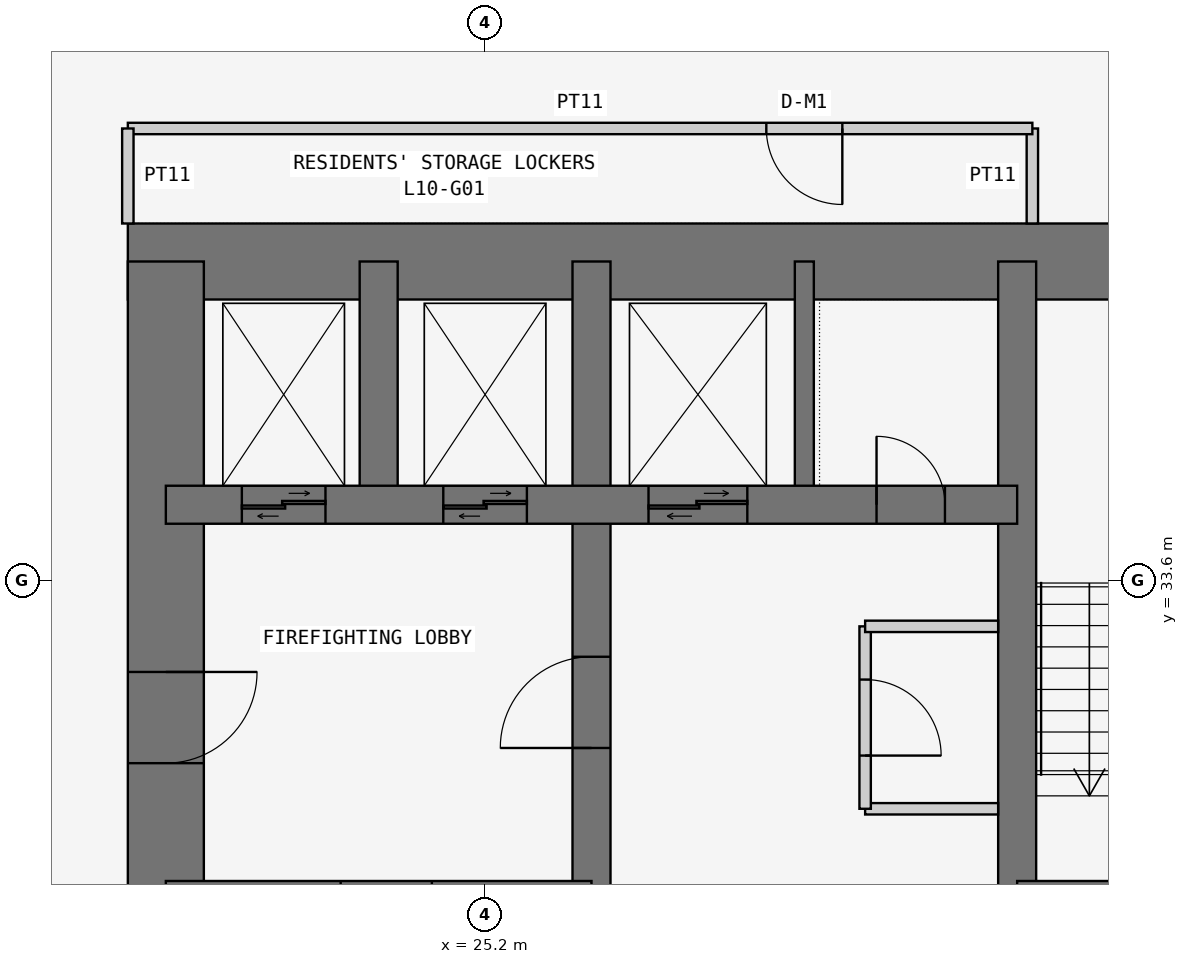
"""IFC4 building model, lengths in metres.
Left out: names, types, materials, properties, quantities, classifications, styles, units other than length and angle.
Written with IfcOpenShell. Run it as: python <this file> out.ifc"""

import sys

from ifc_helpers import new_model, si_unit, direction, frame, frame_2d, origin, place, context, subcontext, project, spatial, rectangle, extrude, element, fill, save


model = new_model("IFC4")
c1 = context("Model", 3, precision=1e-05, world=origin(), true_north=direction((0.0, 1.0)))
c2 = subcontext(c1, "Body", "Model", "MODEL_VIEW")
j1 = project(units=[si_unit("LENGTHUNIT", "METRE"), si_unit("PLANEANGLEUNIT", "RADIAN")], contexts=[c1])
p1 = place(None, origin())
s1 = spatial("IfcSite", under=j1, at=p1, CompositionType="ELEMENT")
p2 = place(p1, origin())
s2 = spatial("IfcBuilding", under=s1, at=p2, CompositionType="ELEMENT")
p3 = place(p2, frame((0.0, 0.0, 45.3)))
s3 = spatial("IfcBuildingStorey", under=s2, at=p3, CompositionType="ELEMENT", Elevation=45.3)
p4 = place(p3, frame((37.8, 37.8, 0.0), z_axis=(0.0, 0.0, 1.0), x_axis=(-1.0, 0.0, 0.0)))
e1 = element("IfcWall", 1, at=p4, inside=s3, PredefinedType="SHEAR", context=c2, shape_type="SweptSolid", body=[
    extrude(rectangle(XDim=17.3, YDim=1.0, at=frame_2d((8.65, 0.0))), origin(), (0.0, 0.0, 1.0), 3.6),
])
p5 = place(p3, frame((21.0, 37.8, 0.0), z_axis=(0.0, 0.0, 1.0), x_axis=(0.0, -1.0, 0.0)))
e2 = element("IfcWall", 2, at=p5, inside=s3, PredefinedType="SHEAR", context=c2, shape_type="SweptSolid", body=[
    extrude(rectangle(XDim=17.3, YDim=1.0, at=frame_2d((8.65, 0.0))), origin(), (0.0, 0.0, 1.0), 3.6),
])
p6 = place(p5, frame((5.4, 0.0, 0.0)))
e3 = element("IfcOpeningElement", 3, at=p6, cuts=e2, PredefinedType="OPENING", context=c2, shape_type="SweptSolid", body=[
    extrude(rectangle(XDim=1.2, YDim=2.1, at=frame_2d((0.6, 1.05))), frame((0.0, 0.51, 0.0), z_axis=(0.0, -1.0, 0.0), x_axis=(1.0, 0.0, 0.0)), (0.0, 0.0, 1.0), 1.02),
])
p7 = place(p3, frame((26.6, 21.0, 0.0), z_axis=(0.0, 0.0, 1.0), x_axis=(0.0, 1.0, 0.0)))
e4 = element("IfcWall", 4, at=p7, inside=s3, PredefinedType="SHEAR", context=c2, shape_type="SweptSolid", body=[
    extrude(rectangle(XDim=16.8, YDim=0.5, at=frame_2d((8.4, 0.0))), origin(), (0.0, 0.0, 1.0), 3.6),
])
p8 = place(p7, frame((10.4, 0.0, 0.0)))
e5 = element("IfcOpeningElement", 5, at=p8, cuts=e4, PredefinedType="OPENING", context=c2, shape_type="SweptSolid", body=[
    extrude(rectangle(XDim=1.2, YDim=2.1, at=frame_2d((0.6, 1.05))), frame((0.0, 0.26, 0.0), z_axis=(0.0, -1.0, 0.0), x_axis=(1.0, 0.0, 0.0)), (0.0, 0.0, 1.0), 0.52),
])
p9 = place(p3, frame((21.0, 29.4, 0.0), z_axis=(0.0, 0.0, 1.0), x_axis=(1.0, 0.0, 0.0)))
e6 = element("IfcWall", 6, at=p9, inside=s3, PredefinedType="SHEAR", context=c2, shape_type="SweptSolid", body=[
    extrude(rectangle(XDim=5.6, YDim=0.5, at=frame_2d((2.8, 0.0))), origin(), (0.0, 0.0, 1.0), 3.6),
])
p10 = place(p9, frame((2.3, 0.0, 0.0)))
e7 = element("IfcOpeningElement", 7, at=p10, cuts=e6, PredefinedType="OPENING", context=c2, shape_type="SweptSolid", body=[
    extrude(rectangle(XDim=1.2, YDim=2.1, at=frame_2d((0.6, 1.05))), frame((0.0, 0.26, 0.0), z_axis=(0.0, -1.0, 0.0), x_axis=(1.0, 0.0, 0.0)), (0.0, 0.0, 1.0), 0.52),
])
p11 = place(p3, frame((21.0, 34.6, 0.0), z_axis=(0.0, 0.0, 1.0), x_axis=(1.0, 0.0, 0.0)))
e8 = element("IfcWall", 8, at=p11, inside=s3, PredefinedType="SHEAR", context=c2, shape_type="SweptSolid", body=[
    extrude(rectangle(XDim=11.2, YDim=0.5, at=frame_2d((5.6, 0.0))), origin(), (0.0, 0.0, 1.0), 3.6),
])
p12 = place(p11, frame((9.35, 0.0, 0.0)))
e9 = element("IfcOpeningElement", 9, at=p12, cuts=e8, PredefinedType="OPENING", context=c2, shape_type="SweptSolid", body=[
    extrude(rectangle(XDim=0.9, YDim=2.1, at=frame_2d((0.45, 1.05))), frame((0.0, 0.26, 0.0), z_axis=(0.0, -1.0, 0.0), x_axis=(1.0, 0.0, 0.0)), (0.0, 0.0, 1.0), 0.52),
])
p13 = place(p11, frame((1.0, 0.0, 0.0)))
e10 = element("IfcOpeningElement", 10, at=p13, cuts=e8, PredefinedType="OPENING", context=c2, shape_type="SweptSolid", body=[
    extrude(rectangle(XDim=1.1, YDim=2.1, at=frame_2d((0.55, 1.05))), frame((0.0, 0.26, 0.0), z_axis=(0.0, -1.0, 0.0), x_axis=(1.0, 0.0, 0.0)), (0.0, 0.0, 1.0), 0.52),
])
p14 = place(p11, frame((3.65, 0.0, 0.0)))
e11 = element("IfcOpeningElement", 11, at=p14, cuts=e8, PredefinedType="OPENING", context=c2, shape_type="SweptSolid", body=[
    extrude(rectangle(XDim=1.1, YDim=2.1, at=frame_2d((0.55, 1.05))), frame((0.0, 0.26, 0.0), z_axis=(0.0, -1.0, 0.0), x_axis=(1.0, 0.0, 0.0)), (0.0, 0.0, 1.0), 0.52),
])
p15 = place(p11, frame((6.35, 0.0, 0.0)))
e12 = element("IfcOpeningElement", 12, at=p15, cuts=e8, PredefinedType="OPENING", context=c2, shape_type="SweptSolid", body=[
    extrude(rectangle(XDim=1.3, YDim=2.1, at=frame_2d((0.65, 1.05))), frame((0.0, 0.26, 0.0), z_axis=(0.0, -1.0, 0.0), x_axis=(1.0, 0.0, 0.0)), (0.0, 0.0, 1.0), 0.52),
])
p16 = place(p3, frame((23.8, 34.6, 0.0), z_axis=(0.0, 0.0, 1.0), x_axis=(0.0, 1.0, 0.0)))
e13 = element("IfcWall", 13, at=p16, inside=s3, PredefinedType="SHEAR", context=c2, shape_type="SweptSolid", body=[
    extrude(rectangle(XDim=3.2, YDim=0.5, at=frame_2d((1.6, 0.0))), origin(), (0.0, 0.0, 1.0), 3.6),
])
p17 = place(p3, frame((32.2, 29.15, 0.0), z_axis=(0.0, 0.0, 1.0), x_axis=(0.0, 1.0, 0.0)))
e14 = element("IfcWall", 14, at=p17, inside=s3, PredefinedType="SHEAR", context=c2, shape_type="SweptSolid", body=[
    extrude(rectangle(XDim=8.65, YDim=0.5, at=frame_2d((4.325, 0.0))), origin(), (0.0, 0.0, 1.0), 3.6),
])
p18 = place(p3, frame((32.2, 29.4, 0.0), z_axis=(0.0, 0.0, 1.0), x_axis=(1.0, 0.0, 0.0)))
e15 = element("IfcWall", 15, at=p18, inside=s3, PredefinedType="SHEAR", context=c2, shape_type="SweptSolid", body=[
    extrude(rectangle(XDim=5.6, YDim=0.5, at=frame_2d((2.8, 0.0))), origin(), (0.0, 0.0, 1.0), 3.6),
])
p19 = place(p18, frame((2.0, 0.0, 0.0)))
e16 = element("IfcOpeningElement", 16, at=p19, cuts=e15, PredefinedType="OPENING", context=c2, shape_type="SweptSolid", body=[
    extrude(rectangle(XDim=1.2, YDim=2.1, at=frame_2d((0.6, 1.05))), frame((0.0, 0.26, 0.0), z_axis=(0.0, -1.0, 0.0), x_axis=(1.0, 0.0, 0.0)), (0.0, 0.0, 1.0), 0.52),
])
p20 = place(p3, frame((29.4, 34.6, 0.0), z_axis=(0.0, 0.0, 1.0), x_axis=(0.0, 1.0, 0.0)))
e17 = element("IfcWall", 17, at=p20, inside=s3, PredefinedType="SHEAR", context=c2, shape_type="SweptSolid", body=[
    extrude(rectangle(XDim=3.2, YDim=0.25, at=frame_2d((1.6, 0.0))), origin(), (0.0, 0.0, 1.0), 3.6),
])
p21 = place(p3, frame((32.4, 38.3, 0.0), z_axis=(0.0, 0.0, 1.0), x_axis=(0.0, 1.0, 0.0)))
e18 = element("IfcWall", 18, at=p21, inside=s3, PredefinedType="PARTITIONING", context=c2, shape_type="SweptSolid", body=[
    extrude(rectangle(XDim=1.25, YDim=0.15, at=frame_2d((0.625, 0.0))), origin(), (0.0, 0.0, 1.0), 3.45),
])
p22 = place(p3, frame((32.4, 39.55, 0.0), z_axis=(0.0, 0.0, 1.0), x_axis=(-1.0, 0.0, 0.0)))
e19 = element("IfcWall", 19, at=p22, inside=s3, PredefinedType="PARTITIONING", context=c2, shape_type="SweptSolid", body=[
    extrude(rectangle(XDim=11.9, YDim=0.15, at=frame_2d((5.95, 0.0))), origin(), (0.0, 0.0, 1.0), 3.45),
])
p23 = place(p22, frame((2.5, 0.0, 0.0)))
e20 = element("IfcOpeningElement", 20, at=p23, cuts=e19, PredefinedType="OPENING", context=c2, shape_type="SweptSolid", body=[
    extrude(rectangle(XDim=1.0, YDim=2.1, at=frame_2d((0.5, 1.05))), frame((0.0, 0.085, 0.0), z_axis=(0.0, -1.0, 0.0), x_axis=(1.0, 0.0, 0.0)), (0.0, 0.0, 1.0), 0.17),
])
p24 = place(p3, frame((20.5, 39.55, 0.0), z_axis=(0.0, 0.0, 1.0), x_axis=(0.0, -1.0, 0.0)))
e21 = element("IfcWall", 21, at=p24, inside=s3, PredefinedType="PARTITIONING", context=c2, shape_type="SweptSolid", body=[
    extrude(rectangle(XDim=1.25, YDim=0.15, at=frame_2d((0.625, 0.0))), origin(), (0.0, 0.0, 1.0), 3.45),
])
p25 = place(p3, frame((31.95, 30.6, 0.0), z_axis=(0.0, 0.0, 1.0), x_axis=(-1.0, 0.0, 0.0)))
e22 = element("IfcWall", 22, at=p25, inside=s3, PredefinedType="PARTITIONING", context=c2, shape_type="SweptSolid", body=[
    extrude(rectangle(XDim=1.75, YDim=0.15, at=frame_2d((0.875, 0.0))), origin(), (0.0, 0.0, 1.0), 3.45),
])
p26 = place(p3, frame((30.2, 30.6, 0.0), z_axis=(0.0, 0.0, 1.0), x_axis=(0.0, 1.0, 0.0)))
e23 = element("IfcWall", 23, at=p26, inside=s3, PredefinedType="PARTITIONING", context=c2, shape_type="SweptSolid", body=[
    extrude(rectangle(XDim=2.4, YDim=0.15, at=frame_2d((1.2, 0.0))), origin(), (0.0, 0.0, 1.0), 3.45),
])
p27 = place(p26, frame((0.7, 0.0, 0.0)))
e24 = element("IfcOpeningElement", 24, at=p27, cuts=e23, PredefinedType="OPENING", context=c2, shape_type="SweptSolid", body=[
    extrude(rectangle(XDim=1.0, YDim=2.1, at=frame_2d((0.5, 1.05))), frame((0.0, 0.085, 0.0), z_axis=(0.0, -1.0, 0.0), x_axis=(1.0, 0.0, 0.0)), (0.0, 0.0, 1.0), 0.17),
])
p28 = place(p3, frame((30.2, 33.0, 0.0), z_axis=(0.0, 0.0, 1.0), x_axis=(1.0, 0.0, 0.0)))
e25 = element("IfcWall", 25, at=p28, inside=s3, PredefinedType="PARTITIONING", context=c2, shape_type="SweptSolid", body=[
    extrude(rectangle(XDim=1.75, YDim=0.15, at=frame_2d((0.875, 0.0))), origin(), (0.0, 0.0, 1.0), 3.45),
])
p29 = place(p23, origin())
e26 = element("IfcDoor", 26, at=p29, inside=s3, OperationType="SINGLE_SWING_LEFT", PredefinedType="DOOR", context=c2, shape_type="SweptSolid", body=[
    extrude(rectangle(XDim=1.0, YDim=2.1, at=frame_2d((0.5, 1.05))), frame((0.0, 0.025, 0.0), z_axis=(0.0, -1.0, 0.0), x_axis=(1.0, 0.0, 0.0)), (0.0, 0.0, 1.0), 0.05),
])
fill(e20, e26)
p30 = place(p6, origin())
e27 = element("IfcDoor", 27, at=p30, inside=s3, OperationType="SINGLE_SWING_LEFT", PredefinedType="DOOR", context=c2, shape_type="SweptSolid", body=[
    extrude(rectangle(XDim=1.2, YDim=2.1, at=frame_2d((0.6, 1.05))), frame((0.0, 0.025, 0.0), z_axis=(0.0, -1.0, 0.0), x_axis=(1.0, 0.0, 0.0)), (0.0, 0.0, 1.0), 0.05),
])
fill(e3, e27)
p31 = place(p8, origin())
e28 = element("IfcDoor", 28, at=p31, inside=s3, OperationType="SINGLE_SWING_LEFT", PredefinedType="DOOR", context=c2, shape_type="SweptSolid", body=[
    extrude(rectangle(XDim=1.2, YDim=2.1, at=frame_2d((0.6, 1.05))), frame((0.0, 0.025, 0.0), z_axis=(0.0, -1.0, 0.0), x_axis=(1.0, 0.0, 0.0)), (0.0, 0.0, 1.0), 0.05),
])
fill(e5, e28)
p32 = place(p12, origin())
e29 = element("IfcDoor", 29, at=p32, inside=s3, OperationType="SINGLE_SWING_LEFT", PredefinedType="DOOR", context=c2, shape_type="SweptSolid", body=[
    extrude(rectangle(XDim=0.9, YDim=2.1, at=frame_2d((0.45, 1.05))), frame((0.0, 0.025, 0.0), z_axis=(0.0, -1.0, 0.0), x_axis=(1.0, 0.0, 0.0)), (0.0, 0.0, 1.0), 0.05),
])
fill(e9, e29)
p33 = place(p27, frame((1.0, 0.0, 0.0), z_axis=(0.0, 0.0, 1.0), x_axis=(-1.0, 0.0, 0.0)))
e30 = element("IfcDoor", 30, at=p33, inside=s3, OperationType="SINGLE_SWING_RIGHT", PredefinedType="DOOR", context=c2, shape_type="SweptSolid", body=[
    extrude(rectangle(XDim=1.0, YDim=2.1, at=frame_2d((0.5, 1.05))), frame((0.0, 0.025, 0.0), z_axis=(0.0, -1.0, 0.0), x_axis=(1.0, 0.0, 0.0)), (0.0, 0.0, 1.0), 0.05),
])
fill(e24, e30)
p34 = place(p13, origin())
e31 = element("IfcDoor", 31, at=p34, inside=s3, OperationType="DOUBLE_DOOR_SLIDING", PredefinedType="DOOR", context=c2, shape_type="SweptSolid", body=[
    extrude(rectangle(XDim=1.1, YDim=2.1, at=frame_2d((0.55, 1.05))), frame((0.0, 0.025, 0.0), z_axis=(0.0, -1.0, 0.0), x_axis=(1.0, 0.0, 0.0)), (0.0, 0.0, 1.0), 0.05),
])
fill(e10, e31)
p35 = place(p14, origin())
e32 = element("IfcDoor", 32, at=p35, inside=s3, OperationType="DOUBLE_DOOR_SLIDING", PredefinedType="DOOR", context=c2, shape_type="SweptSolid", body=[
    extrude(rectangle(XDim=1.1, YDim=2.1, at=frame_2d((0.55, 1.05))), frame((0.0, 0.025, 0.0), z_axis=(0.0, -1.0, 0.0), x_axis=(1.0, 0.0, 0.0)), (0.0, 0.0, 1.0), 0.05),
])
fill(e11, e32)
p36 = place(p15, origin())
e33 = element("IfcDoor", 33, at=p36, inside=s3, OperationType="DOUBLE_DOOR_SLIDING", PredefinedType="DOOR", context=c2, shape_type="SweptSolid", body=[
    extrude(rectangle(XDim=1.3, YDim=2.1, at=frame_2d((0.65, 1.05))), frame((0.0, 0.025, 0.0), z_axis=(0.0, -1.0, 0.0), x_axis=(1.0, 0.0, 0.0)), (0.0, 0.0, 1.0), 0.05),
])
fill(e12, e33)
save(model, sys.argv[1])
